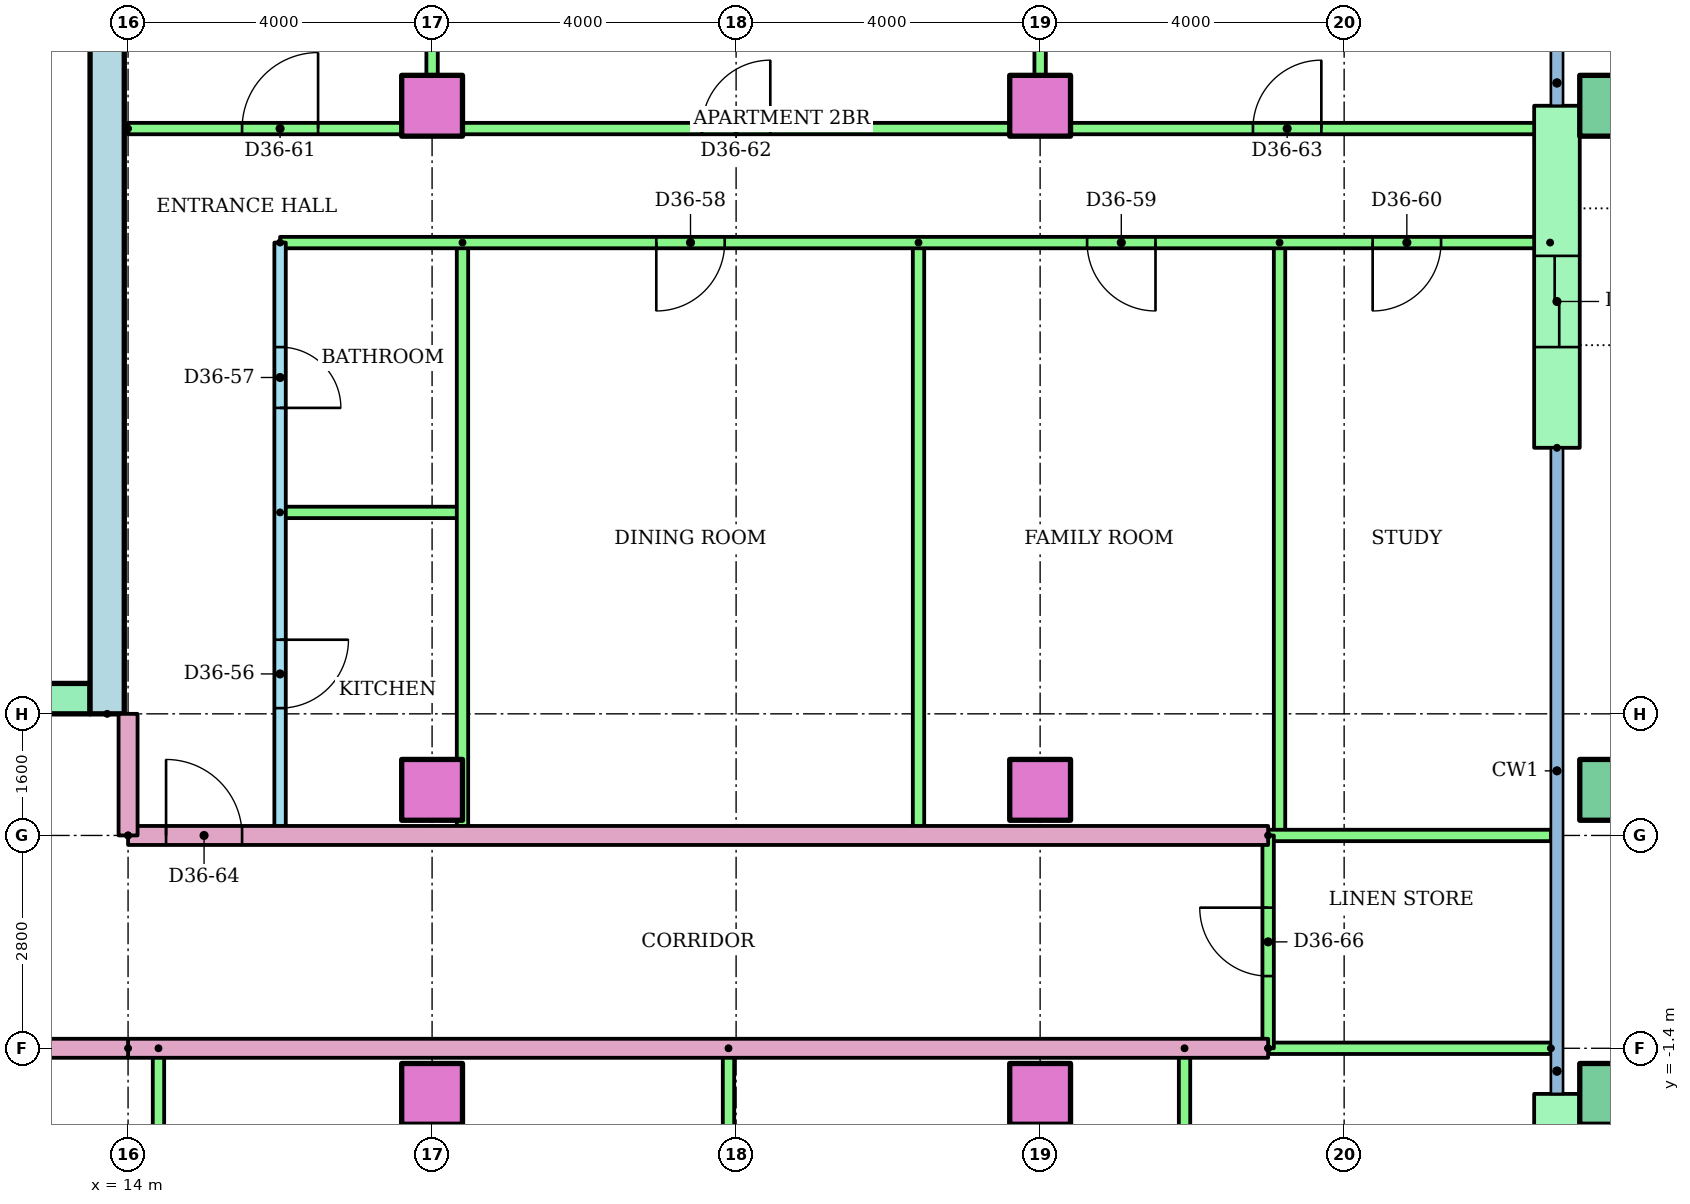
"""IFC4 building model, lengths in metres.
Left out: names, types, materials, properties, quantities, classifications, styles, units other than length and angle.
Written with IfcOpenShell. Run it as: python <this file> out.ifc"""

import sys

from ifc_helpers import new_model, si_unit, direction, frame, frame_2d, origin, origin_2d, place, context, subcontext, project, spatial, rectangle, hollow_rectangle, extrude, element, fill, save


model = new_model("IFC4")
c1 = context("Model", 3, precision=1e-05, world=origin(), true_north=direction((0.0, 1.0)))
c2 = subcontext(c1, "Body", "Model", "MODEL_VIEW")
j1 = project(units=[si_unit("LENGTHUNIT", "METRE"), si_unit("PLANEANGLEUNIT", "RADIAN")], contexts=[c1])
p1 = place(None, origin())
s1 = spatial("IfcSite", under=j1, at=p1, CompositionType="ELEMENT")
p2 = place(p1, origin())
s2 = spatial("IfcBuilding", under=s1, at=p2, CompositionType="ELEMENT")
p3 = place(p2, frame((0.0, 0.0, 139.0)))
s3 = spatial("IfcBuildingStorey", under=s2, at=p3, CompositionType="ELEMENT", Elevation=139.0)
for number, where in (
    (1, (18.0, -2.0, 0.0)),
    (2, (26.0, -2.0, 0.0)),
):
    element("IfcColumn", number, at=place(p3, frame(where)), inside=s3, PredefinedType="COLUMN", context=c2, shape_type="SweptSolid", body=[
        extrude(rectangle(XDim=0.8, YDim=0.8, at=origin_2d()), origin(), (0.0, 0.0, 1.0), 3.2),
    ])
p4 = place(p3, frame((33.5, -2.0, 0.0)))
e3 = element("IfcColumn", 3, at=p4, inside=s3, PredefinedType="COLUMN", context=c2, shape_type="SweptSolid", body=[
    extrude(hollow_rectangle(XDim=0.8, YDim=0.8, WallThickness=0.04, at=origin_2d()), origin(), (0.0, 0.0, 1.0), 3.2),
])
for number, where in (
    (4, (18.0, 2.0, 0.0)),
    (5, (26.0, 2.0, 0.0)),
):
    element("IfcColumn", number, at=place(p3, frame(where)), inside=s3, PredefinedType="COLUMN", context=c2, shape_type="SweptSolid", body=[
        extrude(rectangle(XDim=0.8, YDim=0.8, at=origin_2d()), origin(), (0.0, 0.0, 1.0), 3.2),
    ])
p5 = place(p3, frame((33.5, 2.0, 0.0)))
e6 = element("IfcColumn", 6, at=p5, inside=s3, PredefinedType="COLUMN", context=c2, shape_type="SweptSolid", body=[
    extrude(hollow_rectangle(XDim=0.8, YDim=0.8, WallThickness=0.04, at=origin_2d()), origin(), (0.0, 0.0, 1.0), 3.2),
])
for number, where in (
    (7, (18.0, 11.0, 0.0)),
    (8, (26.0, 11.0, 0.0)),
):
    element("IfcColumn", number, at=place(p3, frame(where)), inside=s3, PredefinedType="COLUMN", context=c2, shape_type="SweptSolid", body=[
        extrude(rectangle(XDim=0.8, YDim=0.8, at=origin_2d()), origin(), (0.0, 0.0, 1.0), 3.2),
    ])
p6 = place(p3, frame((33.5, 11.0, 0.0)))
e9 = element("IfcColumn", 9, at=p6, inside=s3, PredefinedType="COLUMN", context=c2, shape_type="SweptSolid", body=[
    extrude(hollow_rectangle(XDim=0.8, YDim=0.8, WallThickness=0.04, at=origin_2d()), origin(), (0.0, 0.0, 1.0), 3.2),
])
p7 = place(p3, frame((32.8, -5.7, 0.0), z_axis=(0.0, 0.0, 1.0), x_axis=(0.0, 1.0, 0.0)))
e10 = element("IfcWall", 10, at=p7, inside=s3, PredefinedType="STANDARD", context=c2, shape_type="SweptSolid", body=[
    extrude(rectangle(XDim=3.7, YDim=0.6, at=frame_2d((1.85, 0.0))), origin(), (0.0, 0.0, 1.0), 2.92),
])
p8 = place(p7, frame((1.25, 0.0, 0.0)))
e11 = element("IfcOpeningElement", 11, at=p8, cuts=e10, PredefinedType="OPENING", context=c2, shape_type="SweptSolid", body=[
    extrude(rectangle(XDim=1.2, YDim=2.1, at=frame_2d((0.6, 1.05))), frame((0.0, 0.31, 0.0), z_axis=(0.0, -1.0, 0.0), x_axis=(1.0, 0.0, 0.0)), (0.0, 0.0, 1.0), 0.62),
])
p9 = place(p3, frame((32.8, 6.5, 0.0), z_axis=(0.0, 0.0, 1.0), x_axis=(0.0, 1.0, 0.0)))
e12 = element("IfcWall", 12, at=p9, inside=s3, PredefinedType="STANDARD", context=c2, shape_type="SweptSolid", body=[
    extrude(rectangle(XDim=4.5, YDim=0.6, at=frame_2d((2.25, 0.0))), origin(), (0.0, 0.0, 1.0), 2.92),
])
p10 = place(p9, frame((1.325, 0.0, 0.0)))
e13 = element("IfcOpeningElement", 13, at=p10, cuts=e12, PredefinedType="OPENING", context=c2, shape_type="SweptSolid", body=[
    extrude(rectangle(XDim=1.2, YDim=2.1, at=frame_2d((0.6, 1.05))), frame((0.0, 0.31, 0.0), z_axis=(0.0, -1.0, 0.0), x_axis=(1.0, 0.0, 0.0)), (0.0, 0.0, 1.0), 0.62),
])
p11 = place(p3, frame((13.725, 3.0, 0.0), z_axis=(0.0, 0.0, 1.0), x_axis=(0.0, 1.0, 0.0)))
e14 = element("IfcWall", 14, at=p11, inside=s3, PredefinedType="SHEAR", context=c2, shape_type="SweptSolid", body=[
    extrude(rectangle(XDim=17.0, YDim=0.45, at=frame_2d((8.5, 0.0))), origin(), (0.0, 0.0, 1.0), 2.92),
])
p12 = place(p3, frame((-13.5, 3.2, 0.0)))
e15 = element("IfcWall", 15, at=p12, inside=s3, PredefinedType="SHEAR", context=c2, shape_type="SweptSolid", body=[
    extrude(rectangle(XDim=27.0, YDim=0.4, at=frame_2d((13.5, 0.0))), origin(), (0.0, 0.0, 1.0), 2.92),
])
p13 = place(p12, frame((6.861, 0.0, 0.0)))
e16 = element("IfcOpeningElement", 16, at=p13, cuts=e15, PredefinedType="OPENING", context=c2, shape_type="SweptSolid", body=[
    extrude(rectangle(XDim=1.1, YDim=2.1, at=frame_2d((0.55, 1.05))), frame((0.0, 0.21, 0.0), z_axis=(0.0, -1.0, 0.0), x_axis=(1.0, 0.0, 0.0)), (0.0, 0.0, 1.0), 0.42),
])
p14 = place(p12, frame((9.906, 0.0, 0.0)))
e17 = element("IfcOpeningElement", 17, at=p14, cuts=e15, PredefinedType="OPENING", context=c2, shape_type="SweptSolid", body=[
    extrude(rectangle(XDim=1.1, YDim=2.1, at=frame_2d((0.55, 1.05))), frame((0.0, 0.21, 0.0), z_axis=(0.0, -1.0, 0.0), x_axis=(1.0, 0.0, 0.0)), (0.0, 0.0, 1.0), 0.42),
])
p15 = place(p12, frame((15.994, 0.0, 0.0)))
e18 = element("IfcOpeningElement", 18, at=p15, cuts=e15, PredefinedType="OPENING", context=c2, shape_type="SweptSolid", body=[
    extrude(rectangle(XDim=1.1, YDim=2.1, at=frame_2d((0.55, 1.05))), frame((0.0, 0.21, 0.0), z_axis=(0.0, -1.0, 0.0), x_axis=(1.0, 0.0, 0.0)), (0.0, 0.0, 1.0), 0.42),
])
p16 = place(p12, frame((19.039, 0.0, 0.0)))
e19 = element("IfcOpeningElement", 19, at=p16, cuts=e15, PredefinedType="OPENING", context=c2, shape_type="SweptSolid", body=[
    extrude(rectangle(XDim=1.1, YDim=2.1, at=frame_2d((0.55, 1.05))), frame((0.0, 0.21, 0.0), z_axis=(0.0, -1.0, 0.0), x_axis=(1.0, 0.0, 0.0)), (0.0, 0.0, 1.0), 0.42),
])
p17 = place(p12, frame((12.6, 0.0, 0.0)))
e20 = element("IfcOpeningElement", 20, at=p17, cuts=e15, PredefinedType="OPENING", context=c2, shape_type="SweptSolid", body=[
    extrude(rectangle(XDim=1.8, YDim=2.1, at=frame_2d((0.9, 1.05))), frame((0.0, 0.21, 0.0), z_axis=(0.0, -1.0, 0.0), x_axis=(1.0, 0.0, 0.0)), (0.0, 0.0, 1.0), 0.42),
])
for number, where, z_axis, x_axis in (
    (21, (14.4, -1.4, 0.0), (0.0, 0.0, 1.0), (0.0, -1.0, 0.0)),
    (22, (21.9, -1.4, 0.0), (0.0, 0.0, 1.0), (0.0, -1.0, 0.0)),
    (23, (27.9, -1.4, 0.0), (0.0, 0.0, 1.0), (0.0, -1.0, 0.0)),
):
    element("IfcWall", number, at=place(p3, frame(where, z_axis=z_axis, x_axis=x_axis)), inside=s3, PredefinedType="PARTITIONING", context=c2, shape_type="SweptSolid", body=[
        extrude(rectangle(XDim=5.4, YDim=0.15, at=frame_2d((2.7, 0.0))), origin(), (0.0, 0.0, 1.0), 2.4),
    ])
p18 = place(p3, frame((29.0, -1.4, 0.0), z_axis=(0.0, 0.0, 1.0), x_axis=(-1.0, 0.0, 0.0)))
e24 = element("IfcWall", 24, at=p18, inside=s3, PredefinedType="PARTITIONING", context=c2, shape_type="SweptSolid", body=[
    extrude(rectangle(XDim=15.0, YDim=0.25, at=frame_2d((7.5, 0.0))), origin(), (0.0, 0.0, 1.0), 2.4),
])
p19 = place(p3, frame((32.72, -1.4, 0.0), z_axis=(0.0, 0.0, 1.0), x_axis=(-1.0, 0.0, 0.0)))
e25 = element("IfcWall", 25, at=p19, inside=s3, PredefinedType="PARTITIONING", context=c2, shape_type="SweptSolid", body=[
    extrude(rectangle(XDim=3.72, YDim=0.15, at=frame_2d((1.86, 0.0))), origin(), (0.0, 0.0, 1.0), 2.4),
])
p20 = place(p3, frame((16.0, 9.2, 0.0), z_axis=(0.0, 0.0, 1.0), x_axis=(0.0, -1.0, 0.0)))
e26 = element("IfcWall", 26, at=p20, inside=s3, PredefinedType="PARTITIONING", context=c2, shape_type="SweptSolid", body=[
    extrude(rectangle(XDim=7.8, YDim=0.15, at=frame_2d((3.9, 0.0))), origin(), (0.0, 0.0, 1.0), 2.4),
])
p21 = place(p20, frame((5.225, 0.0, 0.0)))
e27 = element("IfcOpeningElement", 27, at=p21, cuts=e26, PredefinedType="OPENING", context=c2, shape_type="SweptSolid", body=[
    extrude(rectangle(XDim=0.9, YDim=2.1, at=frame_2d((0.45, 1.05))), frame((0.0, 0.085, 0.0), z_axis=(0.0, -1.0, 0.0), x_axis=(1.0, 0.0, 0.0)), (0.0, 0.0, 1.0), 0.17),
])
p22 = place(p20, frame((1.375, 0.0, 0.0)))
e28 = element("IfcOpeningElement", 28, at=p22, cuts=e26, PredefinedType="OPENING", context=c2, shape_type="SweptSolid", body=[
    extrude(rectangle(XDim=0.8, YDim=2.1, at=frame_2d((0.4, 1.05))), frame((0.0, 0.085, 0.0), z_axis=(0.0, -1.0, 0.0), x_axis=(1.0, 0.0, 0.0)), (0.0, 0.0, 1.0), 0.17),
])
p23 = place(p3, frame((16.0, 5.65, 0.0)))
e29 = element("IfcWall", 29, at=p23, inside=s3, PredefinedType="PARTITIONING", context=c2, shape_type="SweptSolid", body=[
    extrude(rectangle(XDim=2.4, YDim=0.15, at=frame_2d((1.2, 0.0))), origin(), (0.0, 0.0, 1.0), 2.4),
])
for number, where, z_axis, x_axis in (
    (30, (18.4, 9.2, 0.0), (0.0, 0.0, 1.0), (0.0, -1.0, 0.0)),
    (31, (24.4, 9.2, 0.0), (0.0, 0.0, 1.0), (0.0, -1.0, 0.0)),
    (32, (29.15, 9.2, 0.0), (0.0, 0.0, 1.0), (0.0, -1.0, 0.0)),
):
    element("IfcWall", number, at=place(p3, frame(where, z_axis=z_axis, x_axis=x_axis)), inside=s3, PredefinedType="PARTITIONING", context=c2, shape_type="SweptSolid", body=[
        extrude(rectangle(XDim=7.8, YDim=0.15, at=frame_2d((3.9, 0.0))), origin(), (0.0, 0.0, 1.0), 2.4),
    ])
p24 = place(p3, frame((32.71, 9.2, 0.0), z_axis=(0.0, 0.0, 1.0), x_axis=(-1.0, 0.0, 0.0)))
e33 = element("IfcWall", 33, at=p24, inside=s3, PredefinedType="PARTITIONING", context=c2, shape_type="SweptSolid", body=[
    extrude(rectangle(XDim=16.71, YDim=0.15, at=frame_2d((8.355, 0.0))), origin(), (0.0, 0.0, 1.0), 2.4),
])
p25 = place(p24, frame((10.86, 0.0, 0.0)))
e34 = element("IfcOpeningElement", 34, at=p25, cuts=e33, PredefinedType="OPENING", context=c2, shape_type="SweptSolid", body=[
    extrude(rectangle(XDim=0.9, YDim=2.1, at=frame_2d((0.45, 1.05))), frame((0.0, 0.085, 0.0), z_axis=(0.0, -1.0, 0.0), x_axis=(1.0, 0.0, 0.0)), (0.0, 0.0, 1.0), 0.17),
])
p26 = place(p24, frame((5.192, 0.0, 0.0)))
e35 = element("IfcOpeningElement", 35, at=p26, cuts=e33, PredefinedType="OPENING", context=c2, shape_type="SweptSolid", body=[
    extrude(rectangle(XDim=0.9, YDim=2.1, at=frame_2d((0.45, 1.05))), frame((0.0, 0.085, 0.0), z_axis=(0.0, -1.0, 0.0), x_axis=(1.0, 0.0, 0.0)), (0.0, 0.0, 1.0), 0.17),
])
p27 = place(p24, frame((1.435, 0.0, 0.0)))
e36 = element("IfcOpeningElement", 36, at=p27, cuts=e33, PredefinedType="OPENING", context=c2, shape_type="SweptSolid", body=[
    extrude(rectangle(XDim=0.9, YDim=2.1, at=frame_2d((0.45, 1.05))), frame((0.0, 0.085, 0.0), z_axis=(0.0, -1.0, 0.0), x_axis=(1.0, 0.0, 0.0)), (0.0, 0.0, 1.0), 0.17),
])
p28 = place(p3, frame((14.0, 10.7, 0.0)))
e37 = element("IfcWall", 37, at=p28, inside=s3, PredefinedType="PARTITIONING", context=c2, shape_type="SweptSolid", body=[
    extrude(rectangle(XDim=18.71, YDim=0.15, at=frame_2d((9.355, 0.0))), origin(), (0.0, 0.0, 1.0), 2.4),
])
p29 = place(p28, frame((1.5, 0.0, 0.0)))
e38 = element("IfcOpeningElement", 38, at=p29, cuts=e37, PredefinedType="OPENING", context=c2, shape_type="SweptSolid", body=[
    extrude(rectangle(XDim=1.0, YDim=2.1, at=frame_2d((0.5, 1.05))), frame((0.0, 0.085, 0.0), z_axis=(0.0, -1.0, 0.0), x_axis=(1.0, 0.0, 0.0)), (0.0, 0.0, 1.0), 0.17),
])
p30 = place(p28, frame((7.55, 0.0, 0.0)))
e39 = element("IfcOpeningElement", 39, at=p30, cuts=e37, PredefinedType="OPENING", context=c2, shape_type="SweptSolid", body=[
    extrude(rectangle(XDim=0.9, YDim=2.1, at=frame_2d((0.45, 1.05))), frame((0.0, 0.085, 0.0), z_axis=(0.0, -1.0, 0.0), x_axis=(1.0, 0.0, 0.0)), (0.0, 0.0, 1.0), 0.17),
])
p31 = place(p28, frame((14.8, 0.0, 0.0)))
e40 = element("IfcOpeningElement", 40, at=p31, cuts=e37, PredefinedType="OPENING", context=c2, shape_type="SweptSolid", body=[
    extrude(rectangle(XDim=0.9, YDim=2.1, at=frame_2d((0.45, 1.05))), frame((0.0, 0.085, 0.0), z_axis=(0.0, -1.0, 0.0), x_axis=(1.0, 0.0, 0.0)), (0.0, 0.0, 1.0), 0.17),
])
for number, where, z_axis, x_axis in (
    (41, (18.0, 18.721, 0.0), (0.0, 0.0, 1.0), (0.0, -1.0, 0.0)),
    (42, (26.0, 18.721, 0.0), (0.0, 0.0, 1.0), (0.0, -1.0, 0.0)),
):
    element("IfcWall", number, at=place(p3, frame(where, z_axis=z_axis, x_axis=x_axis)), inside=s3, PredefinedType="PARTITIONING", context=c2, shape_type="SweptSolid", body=[
        extrude(rectangle(XDim=8.021, YDim=0.15, at=frame_2d((4.01, 0.0))), origin(), (0.0, 0.0, 1.0), 2.4),
    ])
p32 = place(p3, frame((14.0, 1.4, 0.0)))
e43 = element("IfcWall", 43, at=p32, inside=s3, PredefinedType="PARTITIONING", context=c2, shape_type="SweptSolid", body=[
    extrude(rectangle(XDim=15.0, YDim=0.25, at=frame_2d((7.5, 0.0))), origin(), (0.0, 0.0, 1.0), 2.4),
])
p33 = place(p32, frame((0.5, 0.0, 0.0)))
e44 = element("IfcOpeningElement", 44, at=p33, cuts=e43, PredefinedType="OPENING", context=c2, shape_type="SweptSolid", body=[
    extrude(rectangle(XDim=1.0, YDim=2.1, at=frame_2d((0.5, 1.05))), frame((0.0, 0.135, 0.0), z_axis=(0.0, -1.0, 0.0), x_axis=(1.0, 0.0, 0.0)), (0.0, 0.0, 1.0), 0.27),
])
p34 = place(p3, frame((29.0, 1.4, 0.0)))
e45 = element("IfcWall", 45, at=p34, inside=s3, PredefinedType="PARTITIONING", context=c2, shape_type="SweptSolid", body=[
    extrude(rectangle(XDim=3.72, YDim=0.15, at=frame_2d((1.86, 0.0))), origin(), (0.0, 0.0, 1.0), 2.4),
])
p35 = place(p3, frame((29.0, -1.4, 0.0), z_axis=(0.0, 0.0, 1.0), x_axis=(0.0, 1.0, 0.0)))
e46 = element("IfcWall", 46, at=p35, inside=s3, PredefinedType="PARTITIONING", context=c2, shape_type="SweptSolid", body=[
    extrude(rectangle(XDim=2.8, YDim=0.15, at=frame_2d((1.4, 0.0))), origin(), (0.0, 0.0, 1.0), 2.4),
])
p36 = place(p35, frame((0.95, 0.0, 0.0)))
e47 = element("IfcOpeningElement", 47, at=p36, cuts=e46, PredefinedType="OPENING", context=c2, shape_type="SweptSolid", body=[
    extrude(rectangle(XDim=0.9, YDim=2.1, at=frame_2d((0.45, 1.05))), frame((0.0, 0.085, 0.0), z_axis=(0.0, -1.0, 0.0), x_axis=(1.0, 0.0, 0.0)), (0.0, 0.0, 1.0), 0.17),
])
p37 = place(p3, frame((14.0, -1.4, 0.0), z_axis=(0.0, 0.0, 1.0), x_axis=(-1.0, 0.0, 0.0)))
e48 = element("IfcWall", 48, at=p37, inside=s3, PredefinedType="PARTITIONING", context=c2, shape_type="SweptSolid", body=[
    extrude(rectangle(XDim=28.0, YDim=0.25, at=frame_2d((14.0, 0.0))), origin(), (0.0, 0.0, 1.0), 2.4),
])
p38 = place(p37, frame((4.618, 0.0, 0.0)))
e49 = element("IfcOpeningElement", 49, at=p38, cuts=e48, PredefinedType="OPENING", context=c2, shape_type="SweptSolid", body=[
    extrude(rectangle(XDim=1.0, YDim=2.1, at=frame_2d((0.5, 1.05))), frame((0.0, 0.135, 0.0), z_axis=(0.0, -1.0, 0.0), x_axis=(1.0, 0.0, 0.0)), (0.0, 0.0, 1.0), 0.27),
])
p39 = place(p37, frame((2.382, 0.0, 0.0)))
e50 = element("IfcOpeningElement", 50, at=p39, cuts=e48, PredefinedType="OPENING", context=c2, shape_type="SweptSolid", body=[
    extrude(rectangle(XDim=1.0, YDim=2.1, at=frame_2d((0.5, 1.05))), frame((0.0, 0.135, 0.0), z_axis=(0.0, -1.0, 0.0), x_axis=(1.0, 0.0, 0.0)), (0.0, 0.0, 1.0), 0.27),
])
p40 = place(p3, frame((14.0, 1.4, 0.0), z_axis=(0.0, 0.0, 1.0), x_axis=(0.0, 1.0, 0.0)))
e51 = element("IfcWall", 51, at=p40, inside=s3, PredefinedType="PARTITIONING", context=c2, shape_type="SweptSolid", body=[
    extrude(rectangle(XDim=1.6, YDim=0.25, at=frame_2d((0.8, 0.0))), origin(), (0.0, 0.0, 1.0), 2.4),
])
p41 = place(p21, origin())
e52 = element("IfcDoor", 52, at=p41, inside=s3, OperationType="SINGLE_SWING_LEFT", PredefinedType="DOOR", context=c2, shape_type="SweptSolid", body=[
    extrude(rectangle(XDim=0.9, YDim=2.1, at=frame_2d((0.45, 1.05))), frame((0.0, 0.025, 0.0), z_axis=(0.0, -1.0, 0.0), x_axis=(1.0, 0.0, 0.0)), (0.0, 0.0, 1.0), 0.05),
])
fill(e27, e52)
p42 = place(p22, origin())
e53 = element("IfcDoor", 53, at=p42, inside=s3, OperationType="SINGLE_SWING_RIGHT", PredefinedType="DOOR", context=c2, shape_type="SweptSolid", body=[
    extrude(rectangle(XDim=0.8, YDim=2.1, at=frame_2d((0.4, 1.05))), frame((0.0, 0.025, 0.0), z_axis=(0.0, -1.0, 0.0), x_axis=(1.0, 0.0, 0.0)), (0.0, 0.0, 1.0), 0.05),
])
fill(e28, e53)
p43 = place(p25, origin())
e54 = element("IfcDoor", 54, at=p43, inside=s3, OperationType="SINGLE_SWING_RIGHT", PredefinedType="DOOR", context=c2, shape_type="SweptSolid", body=[
    extrude(rectangle(XDim=0.9, YDim=2.1, at=frame_2d((0.45, 1.05))), frame((0.0, 0.025, 0.0), z_axis=(0.0, -1.0, 0.0), x_axis=(1.0, 0.0, 0.0)), (0.0, 0.0, 1.0), 0.05),
])
fill(e34, e54)
p44 = place(p26, origin())
e55 = element("IfcDoor", 55, at=p44, inside=s3, OperationType="SINGLE_SWING_LEFT", PredefinedType="DOOR", context=c2, shape_type="SweptSolid", body=[
    extrude(rectangle(XDim=0.9, YDim=2.1, at=frame_2d((0.45, 1.05))), frame((0.0, 0.025, 0.0), z_axis=(0.0, -1.0, 0.0), x_axis=(1.0, 0.0, 0.0)), (0.0, 0.0, 1.0), 0.05),
])
fill(e35, e55)
p45 = place(p27, origin())
e56 = element("IfcDoor", 56, at=p45, inside=s3, OperationType="SINGLE_SWING_RIGHT", PredefinedType="DOOR", context=c2, shape_type="SweptSolid", body=[
    extrude(rectangle(XDim=0.9, YDim=2.1, at=frame_2d((0.45, 1.05))), frame((0.0, 0.025, 0.0), z_axis=(0.0, -1.0, 0.0), x_axis=(1.0, 0.0, 0.0)), (0.0, 0.0, 1.0), 0.05),
])
fill(e36, e56)
p46 = place(p29, origin())
e57 = element("IfcDoor", 57, at=p46, inside=s3, OperationType="SINGLE_SWING_RIGHT", PredefinedType="DOOR", context=c2, shape_type="SweptSolid", body=[
    extrude(rectangle(XDim=1.0, YDim=2.1, at=frame_2d((0.5, 1.05))), frame((0.0, 0.025, 0.0), z_axis=(0.0, -1.0, 0.0), x_axis=(1.0, 0.0, 0.0)), (0.0, 0.0, 1.0), 0.05),
])
fill(e38, e57)
p47 = place(p30, origin())
e58 = element("IfcDoor", 58, at=p47, inside=s3, OperationType="SINGLE_SWING_RIGHT", PredefinedType="DOOR", context=c2, shape_type="SweptSolid", body=[
    extrude(rectangle(XDim=0.9, YDim=2.1, at=frame_2d((0.45, 1.05))), frame((0.0, 0.025, 0.0), z_axis=(0.0, -1.0, 0.0), x_axis=(1.0, 0.0, 0.0)), (0.0, 0.0, 1.0), 0.05),
])
fill(e39, e58)
p48 = place(p31, origin())
e59 = element("IfcDoor", 59, at=p48, inside=s3, OperationType="SINGLE_SWING_RIGHT", PredefinedType="DOOR", context=c2, shape_type="SweptSolid", body=[
    extrude(rectangle(XDim=0.9, YDim=2.1, at=frame_2d((0.45, 1.05))), frame((0.0, 0.025, 0.0), z_axis=(0.0, -1.0, 0.0), x_axis=(1.0, 0.0, 0.0)), (0.0, 0.0, 1.0), 0.05),
])
fill(e40, e59)
p49 = place(p33, origin())
e60 = element("IfcDoor", 60, at=p49, inside=s3, OperationType="SINGLE_SWING_LEFT", PredefinedType="DOOR", context=c2, shape_type="SweptSolid", body=[
    extrude(rectangle(XDim=1.0, YDim=2.1, at=frame_2d((0.5, 1.05))), frame((0.0, 0.025, 0.0), z_axis=(0.0, -1.0, 0.0), x_axis=(1.0, 0.0, 0.0)), (0.0, 0.0, 1.0), 0.05),
])
fill(e44, e60)
p50 = place(p36, origin())
e61 = element("IfcDoor", 61, at=p50, inside=s3, OperationType="SINGLE_SWING_RIGHT", PredefinedType="DOOR", context=c2, shape_type="SweptSolid", body=[
    extrude(rectangle(XDim=0.9, YDim=2.1, at=frame_2d((0.45, 1.05))), frame((0.0, 0.025, 0.0), z_axis=(0.0, -1.0, 0.0), x_axis=(1.0, 0.0, 0.0)), (0.0, 0.0, 1.0), 0.05),
])
fill(e47, e61)
p51 = place(p10, origin())
e62 = element("IfcDoor", 62, at=p51, inside=s3, OperationType="SLIDING_TO_LEFT", PredefinedType="DOOR", context=c2, shape_type="SweptSolid", body=[
    extrude(rectangle(XDim=1.2, YDim=2.1, at=frame_2d((0.6, 1.05))), frame((0.0, 0.025, 0.0), z_axis=(0.0, -1.0, 0.0), x_axis=(1.0, 0.0, 0.0)), (0.0, 0.0, 1.0), 0.05),
])
fill(e13, e62)
save(model, sys.argv[1])
